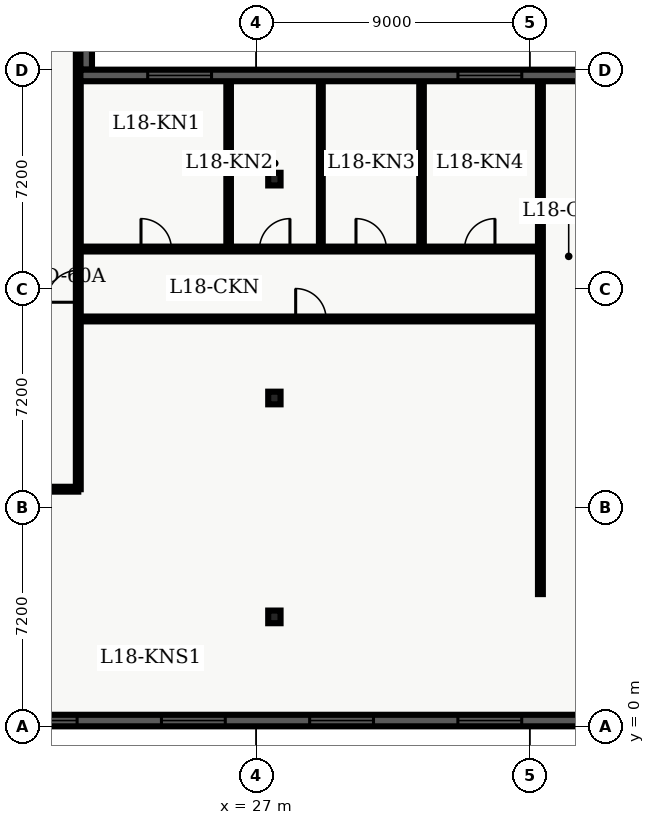
"""IFC4 building model, lengths in metres.
Left out: names, types, materials, properties, quantities, classifications, styles, units other than length and angle.
Written with IfcOpenShell. Run it as: python <this file> out.ifc"""

import sys

from ifc_helpers import new_model, entity, si_unit, converted_unit, direction, frame, origin_with_axes, origin_2d_with_axis, place, context, subcontext, project, spatial, polyline, rectangle, i_section, outline, extrude, element, fill, save


model = new_model("IFC4")
c1 = context("Model", 3, precision=1e-05, world=origin_with_axes(), true_north=direction((0.0, 1.0)))
c2 = subcontext(c1, "Body", "Model", "MODEL_VIEW")
j1 = project(units=[si_unit("LENGTHUNIT", "METRE"), converted_unit("PLANEANGLEUNIT", "DEGREE", entity("IfcPlaneAngleMeasure", 0.017), si_unit("PLANEANGLEUNIT", "RADIAN"), dimensions=[0, 0, 0, 0, 0, 0, 0])], contexts=[c1])
p1 = place(None, origin_with_axes())
s1 = spatial("IfcSite", under=j1, at=p1, CompositionType="ELEMENT")
p2 = place(p1, origin_with_axes())
s2 = spatial("IfcBuilding", under=s1, at=p2, CompositionType="ELEMENT")
p3 = place(p2, frame((0.0, 0.0, 75.6), z_axis=(0.0, 0.0, 1.0), x_axis=(1.0, 0.0, 0.0)))
s3 = spatial("IfcBuildingStorey", under=s2, at=p3, CompositionType="ELEMENT", Elevation=75.6)
for number, where, z_axis, x_axis in (
    (1, (27.6, 3.6, 0.0), (0.0, 0.0, 1.0), (1.0, 0.0, 0.0)),
    (2, (27.6, 10.8, 0.0), (0.0, 0.0, 1.0), (1.0, 0.0, 0.0)),
    (3, (27.6, 18.0, 0.0), (0.0, 0.0, 1.0), (1.0, 0.0, 0.0)),
):
    element("IfcColumn", number, at=place(p3, frame(where, z_axis=z_axis, x_axis=x_axis)), inside=s3, PredefinedType="COLUMN", context=c2, shape_type="SweptSolid", body=[
        extrude(i_section(OverallWidth=0.406, OverallDepth=0.416, WebThickness=0.03, FlangeThickness=0.048, FilletRadius=0.022, at=origin_2d_with_axis()), origin_with_axes(), (0.0, 0.0, 1.0), 3.9),
    ])
p4 = place(p3, frame((2.6, 7.8, 0.0), z_axis=(0.0, 0.0, 1.0), x_axis=(1.0, 0.0, 0.0)))
e4 = element("IfcWall", 4, at=p4, inside=s3, PredefinedType="PARTITIONING", context=c2, shape_type="SweptSolid", body=[
    extrude(outline(polyline([(0.0, -0.08), (18.55, -0.08), (18.55, 0.08), (0.0, 0.08), (0.0, -0.08)])), origin_with_axes(), (0.0, 0.0, 1.0), 2.64),
])
p5 = place(p4, frame((0.894, 0.0, 0.0), z_axis=(0.0, 0.0, 1.0), x_axis=(1.0, 0.0, 0.0)))
e5 = element("IfcOpeningElement", 5, at=p5, cuts=e4, PredefinedType="OPENING", context=c2, shape_type="SweptSolid", body=[
    extrude(rectangle(XDim=1.0, YDim=0.18, at=origin_2d_with_axis()), origin_with_axes(), (0.0, 0.0, 1.0), 2.15),
])
p6 = place(p4, frame((6.55, 0.0, 0.0), z_axis=(0.0, 0.0, 1.0), x_axis=(1.0, 0.0, 0.0)))
e6 = element("IfcOpeningElement", 6, at=p6, cuts=e4, PredefinedType="OPENING", context=c2, shape_type="SweptSolid", body=[
    extrude(rectangle(XDim=1.0, YDim=0.18, at=origin_2d_with_axis()), origin_with_axes(), (0.0, 0.0, 1.0), 2.15),
])
p7 = place(p4, frame((11.932, 0.0, 0.0), z_axis=(0.0, 0.0, 1.0), x_axis=(1.0, 0.0, 0.0)))
e7 = element("IfcOpeningElement", 7, at=p7, cuts=e4, PredefinedType="OPENING", context=c2, shape_type="SweptSolid", body=[
    extrude(rectangle(XDim=1.0, YDim=0.18, at=origin_2d_with_axis()), origin_with_axes(), (0.0, 0.0, 1.0), 2.15),
])
p8 = place(p4, frame((16.502, 0.0, 0.0), z_axis=(0.0, 0.0, 1.0), x_axis=(1.0, 0.0, 0.0)))
e8 = element("IfcOpeningElement", 8, at=p8, cuts=e4, PredefinedType="OPENING", context=c2, shape_type="SweptSolid", body=[
    extrude(rectangle(XDim=1.0, YDim=0.18, at=origin_2d_with_axis()), origin_with_axes(), (0.0, 0.0, 1.0), 2.15),
])
p9 = place(p3, frame((21.15, 7.8, 0.0), z_axis=(0.0, 0.0, 1.0), x_axis=(0.0, 1.0, 0.0)))
e9 = element("IfcWall", 9, at=p9, inside=s3, PredefinedType="PARTITIONING", context=c2, shape_type="SweptSolid", body=[
    extrude(outline(polyline([(0.0, -0.08), (32.7, -0.08), (32.7, 0.08), (0.0, 0.08), (0.0, -0.08)])), origin_with_axes(), (0.0, 0.0, 1.0), 2.64),
])
p10 = place(p9, frame((6.675, 0.0, 0.0), z_axis=(0.0, 0.0, 1.0), x_axis=(1.0, 0.0, 0.0)))
e10 = element("IfcOpeningElement", 10, at=p10, cuts=e9, PredefinedType="OPENING", context=c2, shape_type="SweptSolid", body=[
    extrude(rectangle(XDim=1.05, YDim=0.18, at=origin_2d_with_axis()), origin_with_axes(), (0.0, 0.0, 1.0), 2.15),
])
p11 = place(p3, frame((21.15, 13.4, 0.0), z_axis=(0.0, 0.0, 1.0), x_axis=(1.0, 0.0, 0.0)))
e11 = element("IfcWall", 11, at=p11, inside=s3, PredefinedType="PARTITIONING", context=c2, shape_type="SweptSolid", body=[
    extrude(outline(polyline([(0.0, -0.08), (15.2, -0.08), (15.2, 0.08), (0.0, 0.08), (0.0, -0.08)])), origin_with_axes(), (0.0, 0.0, 1.0), 2.64),
])
p12 = place(p11, frame((7.65, 0.0, 0.0), z_axis=(0.0, 0.0, 1.0), x_axis=(1.0, 0.0, 0.0)))
e12 = element("IfcOpeningElement", 12, at=p12, cuts=e11, PredefinedType="OPENING", context=c2, shape_type="SweptSolid", body=[
    extrude(rectangle(XDim=1.0, YDim=0.18, at=origin_2d_with_axis()), origin_with_axes(), (0.0, 0.0, 1.0), 2.15),
])
p13 = place(p3, frame((21.15, 15.7, 0.0), z_axis=(0.0, 0.0, 1.0), x_axis=(1.0, 0.0, 0.0)))
e13 = element("IfcWall", 13, at=p13, inside=s3, PredefinedType="PARTITIONING", context=c2, shape_type="SweptSolid", body=[
    extrude(outline(polyline([(0.0, -0.08), (15.2, -0.08), (15.2, 0.08), (0.0, 0.08), (0.0, -0.08)])), origin_with_axes(), (0.0, 0.0, 1.0), 2.64),
])
p14 = place(p13, frame((2.562, 0.0, 0.0), z_axis=(0.0, 0.0, 1.0), x_axis=(1.0, 0.0, 0.0)))
e14 = element("IfcOpeningElement", 14, at=p14, cuts=e13, PredefinedType="OPENING", context=c2, shape_type="SweptSolid", body=[
    extrude(rectangle(XDim=1.0, YDim=0.18, at=origin_2d_with_axis()), origin_with_axes(), (0.0, 0.0, 1.0), 2.15),
])
p15 = place(p13, frame((6.462, 0.0, 0.0), z_axis=(0.0, 0.0, 1.0), x_axis=(1.0, 0.0, 0.0)))
e15 = element("IfcOpeningElement", 15, at=p15, cuts=e13, PredefinedType="OPENING", context=c2, shape_type="SweptSolid", body=[
    extrude(rectangle(XDim=1.0, YDim=0.18, at=origin_2d_with_axis()), origin_with_axes(), (0.0, 0.0, 1.0), 2.15),
])
p16 = place(p13, frame((9.634, 0.0, 0.0), z_axis=(0.0, 0.0, 1.0), x_axis=(1.0, 0.0, 0.0)))
e16 = element("IfcOpeningElement", 16, at=p16, cuts=e13, PredefinedType="OPENING", context=c2, shape_type="SweptSolid", body=[
    extrude(rectangle(XDim=1.0, YDim=0.18, at=origin_2d_with_axis()), origin_with_axes(), (0.0, 0.0, 1.0), 2.15),
])
p17 = place(p13, frame((13.205, 0.0, 0.0), z_axis=(0.0, 0.0, 1.0), x_axis=(1.0, 0.0, 0.0)))
e17 = element("IfcOpeningElement", 17, at=p17, cuts=e13, PredefinedType="OPENING", context=c2, shape_type="SweptSolid", body=[
    extrude(rectangle(XDim=1.0, YDim=0.18, at=origin_2d_with_axis()), origin_with_axes(), (0.0, 0.0, 1.0), 2.15),
])
p18 = place(p3, frame((36.35, 4.35, 0.0), z_axis=(0.0, 0.0, 1.0), x_axis=(0.0, 1.0, 0.0)))
e18 = element("IfcWall", 18, at=p18, inside=s3, PredefinedType="PARTITIONING", context=c2, shape_type="SweptSolid", body=[
    extrude(outline(polyline([(0.0, -0.08), (16.95, -0.08), (16.95, 0.08), (0.0, 0.08), (0.0, -0.08)])), origin_with_axes(), (0.0, 0.0, 1.0), 2.64),
])
p19 = place(p3, frame((26.095, 15.82, 0.0), z_axis=(0.0, 0.0, 1.0), x_axis=(0.0, 1.0, 0.0)))
e19 = element("IfcWall", 19, at=p19, inside=s3, PredefinedType="PARTITIONING", context=c2, shape_type="SweptSolid", body=[
    extrude(outline(polyline([(0.0, -0.075), (5.405, -0.075), (5.405, 0.075), (0.0, 0.075), (0.0, -0.075)])), origin_with_axes(), (0.0, 0.0, 1.0), 2.64),
])
p20 = place(p3, frame((29.128, 15.82, 0.0), z_axis=(0.0, 0.0, 1.0), x_axis=(0.0, 1.0, 0.0)))
e20 = element("IfcWall", 20, at=p20, inside=s3, PredefinedType="PARTITIONING", context=c2, shape_type="SweptSolid", body=[
    extrude(outline(polyline([(0.0, -0.062), (5.405, -0.062), (5.405, 0.062), (0.0, 0.062), (0.0, -0.062)])), origin_with_axes(), (0.0, 0.0, 1.0), 2.64),
])
p21 = place(p3, frame((32.44, 15.82, 0.0), z_axis=(0.0, 0.0, 1.0), x_axis=(0.0, 1.0, 0.0)))
e21 = element("IfcWall", 21, at=p21, inside=s3, PredefinedType="PARTITIONING", context=c2, shape_type="SweptSolid", body=[
    extrude(outline(polyline([(0.0, -0.075), (5.405, -0.075), (5.405, 0.075), (0.0, 0.075), (0.0, -0.075)])), origin_with_axes(), (0.0, 0.0, 1.0), 2.64),
])
p22 = place(p3, frame((57.22, 0.19, 0.0), z_axis=(0.0, 0.0, 1.0), x_axis=(-1.0, 0.0, 0.0)))
e22 = element("IfcWall", 22, at=p22, inside=s3, PredefinedType="SOLIDWALL", context=c2, shape_type="SweptSolid", body=[
    extrude(outline(polyline([(0.0, -0.19), (54.82, -0.19), (54.82, 0.19), (0.0, 0.19), (0.0, -0.19)])), origin_with_axes(), (0.0, 0.0, 1.0), 3.6),
])
p23 = place(p22, frame((3.037, 0.0, 0.45), z_axis=(0.0, 0.0, 1.0), x_axis=(1.0, 0.0, 0.0)))
e23 = element("IfcOpeningElement", 23, at=p23, cuts=e22, PredefinedType="OPENING", context=c2, shape_type="SweptSolid", body=[
    extrude(rectangle(XDim=2.1, YDim=0.4, at=origin_2d_with_axis()), origin_with_axes(), (0.0, 0.0, 1.0), 2.2),
])
p24 = place(p22, frame((7.912, 0.0, 0.45), z_axis=(0.0, 0.0, 1.0), x_axis=(1.0, 0.0, 0.0)))
e24 = element("IfcOpeningElement", 24, at=p24, cuts=e22, PredefinedType="OPENING", context=c2, shape_type="SweptSolid", body=[
    extrude(rectangle(XDim=2.1, YDim=0.4, at=origin_2d_with_axis()), origin_with_axes(), (0.0, 0.0, 1.0), 2.2),
])
p25 = place(p22, frame((12.786, 0.0, 0.45), z_axis=(0.0, 0.0, 1.0), x_axis=(1.0, 0.0, 0.0)))
e25 = element("IfcOpeningElement", 25, at=p25, cuts=e22, PredefinedType="OPENING", context=c2, shape_type="SweptSolid", body=[
    extrude(rectangle(XDim=2.1, YDim=0.4, at=origin_2d_with_axis()), origin_with_axes(), (0.0, 0.0, 1.0), 2.2),
])
p26 = place(p22, frame((17.661, 0.0, 0.45), z_axis=(0.0, 0.0, 1.0), x_axis=(1.0, 0.0, 0.0)))
e26 = element("IfcOpeningElement", 26, at=p26, cuts=e22, PredefinedType="OPENING", context=c2, shape_type="SweptSolid", body=[
    extrude(rectangle(XDim=2.1, YDim=0.4, at=origin_2d_with_axis()), origin_with_axes(), (0.0, 0.0, 1.0), 2.2),
])
p27 = place(p22, frame((22.535, 0.0, 0.45), z_axis=(0.0, 0.0, 1.0), x_axis=(1.0, 0.0, 0.0)))
e27 = element("IfcOpeningElement", 27, at=p27, cuts=e22, PredefinedType="OPENING", context=c2, shape_type="SweptSolid", body=[
    extrude(rectangle(XDim=2.1, YDim=0.4, at=origin_2d_with_axis()), origin_with_axes(), (0.0, 0.0, 1.0), 2.2),
])
p28 = place(p22, frame((27.41, 0.0, 0.45), z_axis=(0.0, 0.0, 1.0), x_axis=(1.0, 0.0, 0.0)))
e28 = element("IfcOpeningElement", 28, at=p28, cuts=e22, PredefinedType="OPENING", context=c2, shape_type="SweptSolid", body=[
    extrude(rectangle(XDim=2.1, YDim=0.4, at=origin_2d_with_axis()), origin_with_axes(), (0.0, 0.0, 1.0), 2.2),
])
p29 = place(p22, frame((32.285, 0.0, 0.45), z_axis=(0.0, 0.0, 1.0), x_axis=(1.0, 0.0, 0.0)))
e29 = element("IfcOpeningElement", 29, at=p29, cuts=e22, PredefinedType="OPENING", context=c2, shape_type="SweptSolid", body=[
    extrude(rectangle(XDim=2.1, YDim=0.4, at=origin_2d_with_axis()), origin_with_axes(), (0.0, 0.0, 1.0), 2.2),
])
p30 = place(p22, frame((37.159, 0.0, 0.45), z_axis=(0.0, 0.0, 1.0), x_axis=(1.0, 0.0, 0.0)))
e30 = element("IfcOpeningElement", 30, at=p30, cuts=e22, PredefinedType="OPENING", context=c2, shape_type="SweptSolid", body=[
    extrude(rectangle(XDim=2.1, YDim=0.4, at=origin_2d_with_axis()), origin_with_axes(), (0.0, 0.0, 1.0), 2.2),
])
p31 = place(p22, frame((42.034, 0.0, 0.45), z_axis=(0.0, 0.0, 1.0), x_axis=(1.0, 0.0, 0.0)))
e31 = element("IfcOpeningElement", 31, at=p31, cuts=e22, PredefinedType="OPENING", context=c2, shape_type="SweptSolid", body=[
    extrude(rectangle(XDim=2.1, YDim=0.4, at=origin_2d_with_axis()), origin_with_axes(), (0.0, 0.0, 1.0), 2.2),
])
p32 = place(p22, frame((47.758, 0.0, 0.45), z_axis=(0.0, 0.0, 1.0), x_axis=(1.0, 0.0, 0.0)))
e32 = element("IfcOpeningElement", 32, at=p32, cuts=e22, PredefinedType="OPENING", context=c2, shape_type="SweptSolid", body=[
    extrude(rectangle(XDim=2.1, YDim=0.4, at=origin_2d_with_axis()), origin_with_axes(), (0.0, 0.0, 1.0), 2.2),
])
p33 = place(p22, frame((52.233, 0.0, 0.45), z_axis=(0.0, 0.0, 1.0), x_axis=(1.0, 0.0, 0.0)))
e33 = element("IfcOpeningElement", 33, at=p33, cuts=e22, PredefinedType="OPENING", context=c2, shape_type="SweptSolid", body=[
    extrude(rectangle(XDim=2.1, YDim=0.4, at=origin_2d_with_axis()), origin_with_axes(), (0.0, 0.0, 1.0), 2.2),
])
p34 = place(p3, frame((21.41, 45.82, 0.0), z_axis=(0.0, 0.0, 1.0), x_axis=(0.0, -1.0, 0.0)))
e34 = element("IfcWall", 34, at=p34, inside=s3, PredefinedType="SOLIDWALL", context=c2, shape_type="SweptSolid", body=[
    extrude(outline(polyline([(0.0, -0.19), (24.22, -0.19), (24.22, 0.19), (0.0, 0.19), (0.0, -0.19)])), origin_with_axes(), (0.0, 0.0, 1.0), 3.6),
])
p35 = place(p34, frame((2.902, 0.0, 0.45), z_axis=(0.0, 0.0, 1.0), x_axis=(1.0, 0.0, 0.0)))
e35 = element("IfcOpeningElement", 35, at=p35, cuts=e34, PredefinedType="OPENING", context=c2, shape_type="SweptSolid", body=[
    extrude(rectangle(XDim=2.1, YDim=0.4, at=origin_2d_with_axis()), origin_with_axes(), (0.0, 0.0, 1.0), 2.2),
])
p36 = place(p3, frame((21.22, 21.41, 0.0), z_axis=(0.0, 0.0, 1.0), x_axis=(1.0, 0.0, 0.0)))
e36 = element("IfcWall", 36, at=p36, inside=s3, PredefinedType="SOLIDWALL", context=c2, shape_type="SweptSolid", body=[
    extrude(outline(polyline([(0.0, -0.19), (17.18, -0.19), (17.18, 0.19), (0.0, 0.19), (0.0, -0.19)])), origin_with_axes(), (0.0, 0.0, 1.0), 3.6),
])
p37 = place(p36, frame((3.263, 0.0, 0.45), z_axis=(0.0, 0.0, 1.0), x_axis=(1.0, 0.0, 0.0)))
e37 = element("IfcOpeningElement", 37, at=p37, cuts=e36, PredefinedType="OPENING", context=c2, shape_type="SweptSolid", body=[
    extrude(rectangle(XDim=2.1, YDim=0.4, at=origin_2d_with_axis()), origin_with_axes(), (0.0, 0.0, 1.0), 2.2),
])
p38 = place(p36, frame((13.467, 0.0, 0.45), z_axis=(0.0, 0.0, 1.0), x_axis=(1.0, 0.0, 0.0)))
e38 = element("IfcOpeningElement", 38, at=p38, cuts=e36, PredefinedType="OPENING", context=c2, shape_type="SweptSolid", body=[
    extrude(rectangle(XDim=2.1, YDim=0.4, at=origin_2d_with_axis()), origin_with_axes(), (0.0, 0.0, 1.0), 2.2),
])
p39 = place(p9, frame((6.675, 0.0, 0.0), z_axis=(0.0, 0.0, 1.0), x_axis=(1.0, 0.0, 0.0)))
e39 = element("IfcDoor", 39, at=p39, inside=s3, OperationType="SINGLE_SWING_LEFT", PredefinedType="DOOR", context=c2, shape_type="SweptSolid", body=[
    extrude(rectangle(XDim=1.05, YDim=0.09, at=origin_2d_with_axis()), origin_with_axes(), (0.0, 0.0, 1.0), 2.15),
])
fill(e10, e39)
p40 = place(p11, frame((7.65, 0.0, 0.0), z_axis=(0.0, 0.0, 1.0), x_axis=(1.0, 0.0, 0.0)))
e40 = element("IfcDoor", 40, at=p40, inside=s3, OperationType="SINGLE_SWING_LEFT", PredefinedType="DOOR", context=c2, shape_type="SweptSolid", body=[
    extrude(rectangle(XDim=1.0, YDim=0.09, at=origin_2d_with_axis()), origin_with_axes(), (0.0, 0.0, 1.0), 2.15),
])
fill(e12, e40)
p41 = place(p13, frame((2.562, 0.0, 0.0), z_axis=(0.0, 0.0, 1.0), x_axis=(1.0, 0.0, 0.0)))
e41 = element("IfcDoor", 41, at=p41, inside=s3, OperationType="SINGLE_SWING_LEFT", PredefinedType="DOOR", context=c2, shape_type="SweptSolid", body=[
    extrude(rectangle(XDim=1.0, YDim=0.09, at=origin_2d_with_axis()), origin_with_axes(), (0.0, 0.0, 1.0), 2.15),
])
fill(e14, e41)
p42 = place(p13, frame((6.462, 0.0, 0.0), z_axis=(0.0, 0.0, 1.0), x_axis=(1.0, 0.0, 0.0)))
e42 = element("IfcDoor", 42, at=p42, inside=s3, OperationType="SINGLE_SWING_RIGHT", PredefinedType="DOOR", context=c2, shape_type="SweptSolid", body=[
    extrude(rectangle(XDim=1.0, YDim=0.09, at=origin_2d_with_axis()), origin_with_axes(), (0.0, 0.0, 1.0), 2.15),
])
fill(e15, e42)
p43 = place(p13, frame((9.634, 0.0, 0.0), z_axis=(0.0, 0.0, 1.0), x_axis=(1.0, 0.0, 0.0)))
e43 = element("IfcDoor", 43, at=p43, inside=s3, OperationType="SINGLE_SWING_LEFT", PredefinedType="DOOR", context=c2, shape_type="SweptSolid", body=[
    extrude(rectangle(XDim=1.0, YDim=0.09, at=origin_2d_with_axis()), origin_with_axes(), (0.0, 0.0, 1.0), 2.15),
])
fill(e16, e43)
p44 = place(p13, frame((13.205, 0.0, 0.0), z_axis=(0.0, 0.0, 1.0), x_axis=(1.0, 0.0, 0.0)))
e44 = element("IfcDoor", 44, at=p44, inside=s3, OperationType="SINGLE_SWING_RIGHT", PredefinedType="DOOR", context=c2, shape_type="SweptSolid", body=[
    extrude(rectangle(XDim=1.0, YDim=0.09, at=origin_2d_with_axis()), origin_with_axes(), (0.0, 0.0, 1.0), 2.15),
])
fill(e17, e44)
p45 = place(p22, frame((22.535, 0.0, 0.45), z_axis=(0.0, 0.0, 1.0), x_axis=(1.0, 0.0, 0.0)))
e45 = element("IfcWindow", 45, at=p45, inside=s3, PredefinedType="WINDOW", context=c2, shape_type="SweptSolid", body=[
    extrude(rectangle(XDim=2.1, YDim=0.09, at=origin_2d_with_axis()), origin_with_axes(), (0.0, 0.0, 1.0), 2.2),
])
fill(e27, e45)
p46 = place(p22, frame((27.41, 0.0, 0.45), z_axis=(0.0, 0.0, 1.0), x_axis=(1.0, 0.0, 0.0)))
e46 = element("IfcWindow", 46, at=p46, inside=s3, PredefinedType="WINDOW", context=c2, shape_type="SweptSolid", body=[
    extrude(rectangle(XDim=2.1, YDim=0.09, at=origin_2d_with_axis()), origin_with_axes(), (0.0, 0.0, 1.0), 2.2),
])
fill(e28, e46)
p47 = place(p22, frame((32.285, 0.0, 0.45), z_axis=(0.0, 0.0, 1.0), x_axis=(1.0, 0.0, 0.0)))
e47 = element("IfcWindow", 47, at=p47, inside=s3, PredefinedType="WINDOW", context=c2, shape_type="SweptSolid", body=[
    extrude(rectangle(XDim=2.1, YDim=0.09, at=origin_2d_with_axis()), origin_with_axes(), (0.0, 0.0, 1.0), 2.2),
])
fill(e29, e47)
p48 = place(p22, frame((37.159, 0.0, 0.45), z_axis=(0.0, 0.0, 1.0), x_axis=(1.0, 0.0, 0.0)))
e48 = element("IfcWindow", 48, at=p48, inside=s3, PredefinedType="WINDOW", context=c2, shape_type="SweptSolid", body=[
    extrude(rectangle(XDim=2.1, YDim=0.09, at=origin_2d_with_axis()), origin_with_axes(), (0.0, 0.0, 1.0), 2.2),
])
fill(e30, e48)
p49 = place(p36, frame((3.263, 0.0, 0.45), z_axis=(0.0, 0.0, 1.0), x_axis=(1.0, 0.0, 0.0)))
e49 = element("IfcWindow", 49, at=p49, inside=s3, PredefinedType="WINDOW", context=c2, shape_type="SweptSolid", body=[
    extrude(rectangle(XDim=2.1, YDim=0.09, at=origin_2d_with_axis()), origin_with_axes(), (0.0, 0.0, 1.0), 2.2),
])
fill(e37, e49)
p50 = place(p36, frame((13.467, 0.0, 0.45), z_axis=(0.0, 0.0, 1.0), x_axis=(1.0, 0.0, 0.0)))
e50 = element("IfcWindow", 50, at=p50, inside=s3, PredefinedType="WINDOW", context=c2, shape_type="SweptSolid", body=[
    extrude(rectangle(XDim=2.1, YDim=0.09, at=origin_2d_with_axis()), origin_with_axes(), (0.0, 0.0, 1.0), 2.2),
])
fill(e38, e50)
save(model, sys.argv[1])
